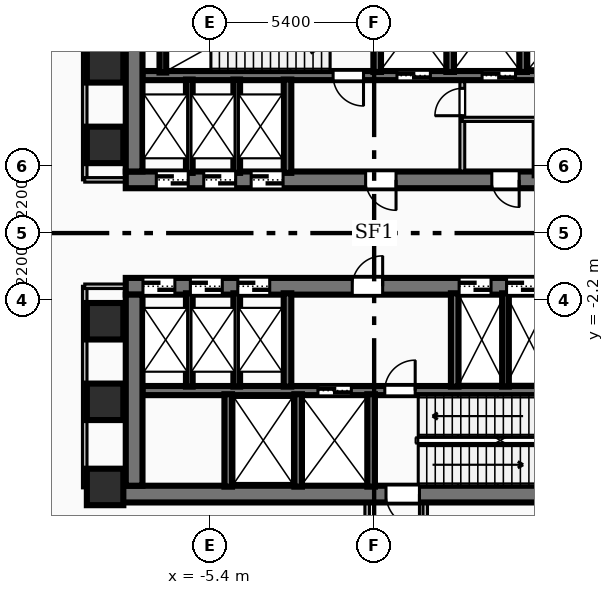
"""IFC4 building model, lengths in metres.
Left out: names, types, materials, properties, quantities, classifications, styles, units other than length and angle.
Written with IfcOpenShell. Run it as: python <this file> out.ifc"""

import sys

from ifc_helpers import new_model, si_unit, direction, frame, frame_2d, origin, origin_2d, place, context, subcontext, project, spatial, rectangle, extrude, element, fill, save


model = new_model("IFC4")
c1 = context("Model", 3, precision=1e-05, world=origin(), true_north=direction((0.0, 1.0)))
c2 = subcontext(c1, "Body", "Model", "MODEL_VIEW")
j1 = project(units=[si_unit("LENGTHUNIT", "METRE"), si_unit("PLANEANGLEUNIT", "RADIAN")], contexts=[c1])
p1 = place(None, origin())
s1 = spatial("IfcSite", under=j1, at=p1, CompositionType="ELEMENT")
p2 = place(p1, origin())
s2 = spatial("IfcBuilding", under=s1, at=p2, CompositionType="ELEMENT")
p3 = place(p2, origin())
s3 = spatial("IfcBuildingStorey", under=s2, at=p3, CompositionType="ELEMENT", Elevation=0.0)
p4 = place(p3, frame((8.17, 1.75, 0.0), z_axis=(0.0, 0.0, 1.0), x_axis=(-1.0, 0.0, 0.0)))
e1 = element("IfcWall", 1, at=p4, inside=s3, PredefinedType="SHEAR", context=c2, shape_type="SweptSolid", body=[
    extrude(rectangle(XDim=16.34, YDim=0.55, at=frame_2d((8.17, 0.0))), origin(), (0.0, 0.0, 1.0), 5.08),
])
p5 = place(p4, frame((7.45, 0.0, 0.0)))
e2 = element("IfcOpeningElement", 2, at=p5, cuts=e1, PredefinedType="OPENING", context=c2, shape_type="SweptSolid", body=[
    extrude(rectangle(XDim=1.0, YDim=2.1, at=frame_2d((0.5, 1.05))), frame((0.0, 0.285, 0.0), z_axis=(0.0, -1.0, 0.0), x_axis=(1.0, 0.0, 0.0)), (0.0, 0.0, 1.0), 0.57),
])
p6 = place(p4, frame((14.285, 0.0, 0.0)))
e3 = element("IfcOpeningElement", 3, at=p6, cuts=e1, PredefinedType="OPENING", context=c2, shape_type="SweptSolid", body=[
    extrude(rectangle(XDim=1.05, YDim=2.15, at=frame_2d((0.525, 1.075))), frame((0.0, 0.285, 0.0), z_axis=(0.0, -1.0, 0.0), x_axis=(1.0, 0.0, 0.0)), (0.0, 0.0, 1.0), 0.57),
])
p7 = place(p4, frame((12.725, 0.0, 0.0)))
e4 = element("IfcOpeningElement", 4, at=p7, cuts=e1, PredefinedType="OPENING", context=c2, shape_type="SweptSolid", body=[
    extrude(rectangle(XDim=1.05, YDim=2.15, at=frame_2d((0.525, 1.075))), frame((0.0, 0.285, 0.0), z_axis=(0.0, -1.0, 0.0), x_axis=(1.0, 0.0, 0.0)), (0.0, 0.0, 1.0), 0.57),
])
p8 = place(p4, frame((11.165, 0.0, 0.0)))
e5 = element("IfcOpeningElement", 5, at=p8, cuts=e1, PredefinedType="OPENING", context=c2, shape_type="SweptSolid", body=[
    extrude(rectangle(XDim=1.05, YDim=2.15, at=frame_2d((0.525, 1.075))), frame((0.0, 0.285, 0.0), z_axis=(0.0, -1.0, 0.0), x_axis=(1.0, 0.0, 0.0)), (0.0, 0.0, 1.0), 0.57),
])
p9 = place(p4, frame((3.4, 0.0, 0.0)))
e6 = element("IfcOpeningElement", 6, at=p9, cuts=e1, PredefinedType="OPENING", context=c2, shape_type="SweptSolid", body=[
    extrude(rectangle(XDim=0.9, YDim=2.06, at=frame_2d((0.45, 1.03))), frame((0.0, 0.285, 0.0), z_axis=(0.0, -1.0, 0.0), x_axis=(1.0, 0.0, 0.0)), (0.0, 0.0, 1.0), 0.57),
])
p10 = place(p4, frame((1.1, 0.0, 0.0)))
e7 = element("IfcOpeningElement", 7, at=p10, cuts=e1, PredefinedType="OPENING", context=c2, shape_type="SweptSolid", body=[
    extrude(rectangle(XDim=0.9, YDim=2.06, at=frame_2d((0.45, 1.03))), frame((0.0, 0.285, 0.0), z_axis=(0.0, -1.0, 0.0), x_axis=(1.0, 0.0, 0.0)), (0.0, 0.0, 1.0), 0.57),
])
p11 = place(p3, frame((-7.895, 2.025, 0.0), z_axis=(0.0, 0.0, 1.0), x_axis=(0.0, 1.0, 0.0)))
e8 = element("IfcWall", 8, at=p11, inside=s3, PredefinedType="SHEAR", context=c2, shape_type="SweptSolid", body=[
    extrude(rectangle(XDim=6.285, YDim=0.55, at=frame_2d((3.143, 0.0))), origin(), (0.0, 0.0, 1.0), 5.08),
])
p12 = place(p3, frame((7.62, 5.18, 0.0), z_axis=(0.0, 0.0, 1.0), x_axis=(-1.0, 0.0, 0.0)))
e9 = element("IfcWall", 9, at=p12, inside=s3, PredefinedType="SOLIDWALL", context=c2, shape_type="SweptSolid", body=[
    extrude(rectangle(XDim=15.24, YDim=0.3, at=frame_2d((7.62, 0.0))), origin(), (0.0, 0.0, 1.0), 5.08),
])
p13 = place(p12, frame((5.77, 0.0, 0.0)))
e10 = element("IfcOpeningElement", 10, at=p13, cuts=e9, PredefinedType="OPENING", context=c2, shape_type="SweptSolid", body=[
    extrude(rectangle(XDim=1.1, YDim=2.15, at=frame_2d((0.55, 1.075))), frame((0.0, 0.16, 0.0), z_axis=(0.0, -1.0, 0.0), x_axis=(1.0, 0.0, 0.0)), (0.0, 0.0, 1.0), 0.32),
])
p14 = place(p12, frame((2.97, 0.0, 0.0)))
e11 = element("IfcOpeningElement", 11, at=p14, cuts=e9, PredefinedType="OPENING", context=c2, shape_type="SweptSolid", body=[
    extrude(rectangle(XDim=1.1, YDim=2.15, at=frame_2d((0.55, 1.075))), frame((0.0, 0.16, 0.0), z_axis=(0.0, -1.0, 0.0), x_axis=(1.0, 0.0, 0.0)), (0.0, 0.0, 1.0), 0.32),
])
p15 = place(p12, frame((7.97, 0.0, 0.0)))
e12 = element("IfcOpeningElement", 12, at=p15, cuts=e9, PredefinedType="OPENING", context=c2, shape_type="SweptSolid", body=[
    extrude(rectangle(XDim=1.0, YDim=2.1, at=frame_2d((0.5, 1.05))), frame((0.0, 0.16, 0.0), z_axis=(0.0, -1.0, 0.0), x_axis=(1.0, 0.0, 0.0)), (0.0, 0.0, 1.0), 0.32),
])
p16 = place(p3, frame((8.78, -8.585, 0.0), z_axis=(0.0, 0.0, 1.0), x_axis=(-1.0, 0.0, 0.0)))
e13 = element("IfcWall", 13, at=p16, inside=s3, PredefinedType="SHEAR", context=c2, shape_type="SweptSolid", body=[
    extrude(rectangle(XDim=17.56, YDim=0.55, at=frame_2d((8.78, 0.0))), origin(), (0.0, 0.0, 1.0), 5.08),
])
p17 = place(p16, frame((7.29, 0.0, 0.0)))
e14 = element("IfcOpeningElement", 14, at=p17, cuts=e13, PredefinedType="OPENING", context=c2, shape_type="SweptSolid", body=[
    extrude(rectangle(XDim=1.1, YDim=2.15, at=frame_2d((0.55, 1.075))), frame((0.0, 0.285, 0.0), z_axis=(0.0, -1.0, 0.0), x_axis=(1.0, 0.0, 0.0)), (0.0, 0.0, 1.0), 0.57),
])
p18 = place(p3, frame((-8.17, -1.75, 0.0), z_axis=(0.0, 0.0, 1.0), x_axis=(1.0, 0.0, 0.0)))
e15 = element("IfcWall", 15, at=p18, inside=s3, PredefinedType="SHEAR", context=c2, shape_type="SweptSolid", body=[
    extrude(rectangle(XDim=16.34, YDim=0.55, at=frame_2d((8.17, 0.0))), origin(), (0.0, 0.0, 1.0), 5.08),
])
p19 = place(p18, frame((7.45, 0.0, 0.0)))
e16 = element("IfcOpeningElement", 16, at=p19, cuts=e15, PredefinedType="OPENING", context=c2, shape_type="SweptSolid", body=[
    extrude(rectangle(XDim=1.0, YDim=2.1, at=frame_2d((0.5, 1.05))), frame((0.0, 0.285, 0.0), z_axis=(0.0, -1.0, 0.0), x_axis=(1.0, 0.0, 0.0)), (0.0, 0.0, 1.0), 0.57),
])
p20 = place(p18, frame((10.965, 0.0, 0.0)))
e17 = element("IfcOpeningElement", 17, at=p20, cuts=e15, PredefinedType="OPENING", context=c2, shape_type="SweptSolid", body=[
    extrude(rectangle(XDim=1.05, YDim=2.15, at=frame_2d((0.525, 1.075))), frame((0.0, 0.285, 0.0), z_axis=(0.0, -1.0, 0.0), x_axis=(1.0, 0.0, 0.0)), (0.0, 0.0, 1.0), 0.57),
])
p21 = place(p18, frame((12.525, 0.0, 0.0)))
e18 = element("IfcOpeningElement", 18, at=p21, cuts=e15, PredefinedType="OPENING", context=c2, shape_type="SweptSolid", body=[
    extrude(rectangle(XDim=1.05, YDim=2.15, at=frame_2d((0.525, 1.075))), frame((0.0, 0.285, 0.0), z_axis=(0.0, -1.0, 0.0), x_axis=(1.0, 0.0, 0.0)), (0.0, 0.0, 1.0), 0.57),
])
p22 = place(p18, frame((14.085, 0.0, 0.0)))
e19 = element("IfcOpeningElement", 19, at=p22, cuts=e15, PredefinedType="OPENING", context=c2, shape_type="SweptSolid", body=[
    extrude(rectangle(XDim=1.05, YDim=2.15, at=frame_2d((0.525, 1.075))), frame((0.0, 0.285, 0.0), z_axis=(0.0, -1.0, 0.0), x_axis=(1.0, 0.0, 0.0)), (0.0, 0.0, 1.0), 0.57),
])
p23 = place(p18, frame((0.565, 0.0, 0.0)))
e20 = element("IfcOpeningElement", 20, at=p23, cuts=e15, PredefinedType="OPENING", context=c2, shape_type="SweptSolid", body=[
    extrude(rectangle(XDim=1.05, YDim=2.15, at=frame_2d((0.525, 1.075))), frame((0.0, 0.285, 0.0), z_axis=(0.0, -1.0, 0.0), x_axis=(1.0, 0.0, 0.0)), (0.0, 0.0, 1.0), 0.57),
])
p24 = place(p18, frame((2.125, 0.0, 0.0)))
e21 = element("IfcOpeningElement", 21, at=p24, cuts=e15, PredefinedType="OPENING", context=c2, shape_type="SweptSolid", body=[
    extrude(rectangle(XDim=1.05, YDim=2.15, at=frame_2d((0.525, 1.075))), frame((0.0, 0.285, 0.0), z_axis=(0.0, -1.0, 0.0), x_axis=(1.0, 0.0, 0.0)), (0.0, 0.0, 1.0), 0.57),
])
p25 = place(p18, frame((3.685, 0.0, 0.0)))
e22 = element("IfcOpeningElement", 22, at=p25, cuts=e15, PredefinedType="OPENING", context=c2, shape_type="SweptSolid", body=[
    extrude(rectangle(XDim=1.05, YDim=2.15, at=frame_2d((0.525, 1.075))), frame((0.0, 0.285, 0.0), z_axis=(0.0, -1.0, 0.0), x_axis=(1.0, 0.0, 0.0)), (0.0, 0.0, 1.0), 0.57),
])
p26 = place(p3, frame((-7.895, -8.31, 0.0), z_axis=(0.0, 0.0, 1.0), x_axis=(0.0, 1.0, 0.0)))
e23 = element("IfcWall", 23, at=p26, inside=s3, PredefinedType="SHEAR", context=c2, shape_type="SweptSolid", body=[
    extrude(rectangle(XDim=6.285, YDim=0.55, at=frame_2d((3.143, 0.0))), origin(), (0.0, 0.0, 1.0), 5.08),
])
p27 = place(p3, frame((-7.62, -5.18, 0.0), z_axis=(0.0, 0.0, 1.0), x_axis=(1.0, 0.0, 0.0)))
e24 = element("IfcWall", 24, at=p27, inside=s3, PredefinedType="SOLIDWALL", context=c2, shape_type="SweptSolid", body=[
    extrude(rectangle(XDim=15.24, YDim=0.3, at=frame_2d((7.62, 0.0))), origin(), (0.0, 0.0, 1.0), 5.08),
])
p28 = place(p27, frame((5.77, 0.0, 0.0)))
e25 = element("IfcOpeningElement", 25, at=p28, cuts=e24, PredefinedType="OPENING", context=c2, shape_type="SweptSolid", body=[
    extrude(rectangle(XDim=1.1, YDim=2.15, at=frame_2d((0.55, 1.075))), frame((0.0, 0.16, 0.0), z_axis=(0.0, -1.0, 0.0), x_axis=(1.0, 0.0, 0.0)), (0.0, 0.0, 1.0), 0.32),
])
p29 = place(p27, frame((7.97, 0.0, 0.0)))
e26 = element("IfcOpeningElement", 26, at=p29, cuts=e24, PredefinedType="OPENING", context=c2, shape_type="SweptSolid", body=[
    extrude(rectangle(XDim=1.0, YDim=2.1, at=frame_2d((0.5, 1.05))), frame((0.0, 0.16, 0.0), z_axis=(0.0, -1.0, 0.0), x_axis=(1.0, 0.0, 0.0)), (0.0, 0.0, 1.0), 0.32),
])
p30 = place(p3, frame((-6.95, 5.28, 0.0), z_axis=(0.0, 0.0, 1.0), x_axis=(0.0, 1.0, 0.0)))
e27 = element("IfcWall", 27, at=p30, inside=s3, PredefinedType="SOLIDWALL", context=c2, shape_type="SweptSolid", body=[
    extrude(rectangle(XDim=3.06, YDim=0.22, at=frame_2d((1.53, 0.0))), origin(), (0.0, 0.0, 1.0), 5.08),
])
for number, where, z_axis, x_axis in (
    (28, (0.1, 5.3, 0.0), (0.0, 0.0, 1.0), (0.0, 1.0, 0.0)),
    (29, (2.5, 5.3, 0.0), (0.0, 0.0, 1.0), (0.0, 1.0, 0.0)),
    (30, (4.9, 5.3, 0.0), (0.0, 0.0, 1.0), (0.0, 1.0, 0.0)),
):
    element("IfcWall", number, at=place(p3, frame(where, z_axis=z_axis, x_axis=x_axis)), inside=s3, PredefinedType="SOLIDWALL", context=c2, shape_type="SweptSolid", body=[
        extrude(rectangle(XDim=3.04, YDim=0.25, at=frame_2d((1.52, 0.0))), origin(), (0.0, 0.0, 1.0), 5.08),
    ])
p31 = place(p3, frame((-2.85, 1.98, 0.0), z_axis=(0.0, 0.0, 1.0), x_axis=(0.0, 1.0, 0.0)))
e31 = element("IfcWall", 31, at=p31, inside=s3, PredefinedType="SOLIDWALL", context=c2, shape_type="SweptSolid", body=[
    extrude(rectangle(XDim=3.07, YDim=0.25, at=frame_2d((1.535, 0.0))), origin(), (0.0, 0.0, 1.0), 5.08),
])
for number, where, z_axis, x_axis in (
    (32, (-0.1, -8.34, 0.0), (0.0, 0.0, 1.0), (0.0, 1.0, 0.0)),
    (33, (-2.5, -8.34, 0.0), (0.0, 0.0, 1.0), (0.0, 1.0, 0.0)),
    (34, (-4.8, -8.34, 0.0), (0.0, 0.0, 1.0), (0.0, 1.0, 0.0)),
):
    element("IfcWall", number, at=place(p3, frame(where, z_axis=z_axis, x_axis=x_axis)), inside=s3, PredefinedType="SOLIDWALL", context=c2, shape_type="SweptSolid", body=[
        extrude(rectangle(XDim=3.04, YDim=0.25, at=frame_2d((1.52, 0.0))), origin(), (0.0, 0.0, 1.0), 5.08),
    ])
for number, where, z_axis, x_axis in (
    (35, (-2.85, -5.05, 0.0), (0.0, 0.0, 1.0), (0.0, 1.0, 0.0)),
    (36, (2.65, -5.05, 0.0), (0.0, 0.0, 1.0), (0.0, 1.0, 0.0)),
):
    element("IfcWall", number, at=place(p3, frame(where, z_axis=z_axis, x_axis=x_axis)), inside=s3, PredefinedType="SOLIDWALL", context=c2, shape_type="SweptSolid", body=[
        extrude(rectangle(XDim=3.07, YDim=0.25, at=frame_2d((1.535, 0.0))), origin(), (0.0, 0.0, 1.0), 5.08),
    ])
for number, where, z_axis, x_axis in (
    (37, (-6.08, 1.98, 0.0), (0.0, 0.0, 1.0), (0.0, 1.0, 0.0)),
    (38, (-4.52, 1.98, 0.0), (0.0, 0.0, 1.0), (0.0, 1.0, 0.0)),
    (39, (4.32, -5.05, 0.0), (0.0, 0.0, 1.0), (0.0, 1.0, 0.0)),
    (40, (-6.08, -5.05, 0.0), (0.0, 0.0, 1.0), (0.0, 1.0, 0.0)),
    (41, (-4.52, -5.05, 0.0), (0.0, 0.0, 1.0), (0.0, 1.0, 0.0)),
):
    element("IfcWall", number, at=place(p3, frame(where, z_axis=z_axis, x_axis=x_axis)), inside=s3, PredefinedType="SOLIDWALL", context=c2, shape_type="SweptSolid", body=[
        extrude(rectangle(XDim=3.07, YDim=0.22, at=frame_2d((1.535, 0.0))), origin(), (0.0, 0.0, 1.0), 5.08),
    ])
for number, where, z_axis, x_axis in (
    (42, (-8.85, -5.55, 0.0), (0.0, 0.0, 1.0), (1.0, 0.0, 0.0)),
    (43, (-8.85, -2.9, 0.0), (0.0, 0.0, 1.0), (1.0, 0.0, 0.0)),
    (44, (-8.85, 2.9, 0.0), (0.0, 0.0, 1.0), (1.0, 0.0, 0.0)),
    (45, (-8.85, 5.55, 0.0), (0.0, 0.0, 1.0), (1.0, 0.0, 0.0)),
    (46, (-8.85, -8.35, 0.0), (0.0, 0.0, 1.0), (1.0, 0.0, 0.0)),
):
    element("IfcColumn", number, at=place(p3, frame(where, z_axis=z_axis, x_axis=x_axis)), inside=s3, PredefinedType="COLUMN", context=c2, shape_type="SweptSolid", body=[
        extrude(rectangle(XDim=1.2, YDim=1.2, at=origin_2d()), origin(), (0.0, 0.0, 1.0), 5.4),
    ])
p32 = place(p3, frame((2.9, 2.04, 0.0), z_axis=(0.0, 0.0, 1.0), x_axis=(0.0, 1.0, 0.0)))
e47 = element("IfcWall", 47, at=p32, inside=s3, PredefinedType="PARTITIONING", context=c2, shape_type="SweptSolid", body=[
    extrude(rectangle(XDim=2.94, YDim=0.16, at=frame_2d((1.47, 0.0))), origin(), (0.0, 0.0, 1.0), 4.145),
])
p33 = place(p32, frame((1.82, 0.0, 0.0)))
e48 = element("IfcOpeningElement", 48, at=p33, cuts=e47, PredefinedType="OPENING", context=c2, shape_type="SweptSolid", body=[
    extrude(rectangle(XDim=0.9, YDim=2.06, at=frame_2d((0.45, 1.03))), frame((0.0, 0.09, 0.0), z_axis=(0.0, -1.0, 0.0), x_axis=(1.0, 0.0, 0.0)), (0.0, 0.0, 1.0), 0.18),
])
p34 = place(p3, frame((2.9, 3.74, 0.0), z_axis=(0.0, 0.0, 1.0), x_axis=(1.0, 0.0, 0.0)))
e49 = element("IfcWall", 49, at=p34, inside=s3, PredefinedType="PARTITIONING", context=c2, shape_type="SweptSolid", body=[
    extrude(rectangle(XDim=4.65, YDim=0.138, at=frame_2d((2.325, 0.0))), origin(), (0.0, 0.0, 1.0), 5.08),
])
p35 = place(p3, frame((5.3, 1.85, 0.0), z_axis=(0.0, 0.0, 1.0), x_axis=(0.0, 1.0, 0.0)))
e50 = element("IfcWall", 50, at=p35, inside=s3, PredefinedType="PARTITIONING", context=c2, shape_type="SweptSolid", body=[
    extrude(rectangle(XDim=1.89, YDim=0.138, at=frame_2d((0.945, 0.0))), origin(), (0.0, 0.0, 1.0), 4.145),
])
p36 = place(p3, frame((-9.52, 1.75, 0.0), z_axis=(0.0, 0.0, 1.0), x_axis=(0.0, 1.0, 0.0)))
e51 = element("IfcWall", 51, at=p36, inside=s3, PredefinedType="PARTITIONING", context=c2, shape_type="SweptSolid", body=[
    extrude(rectangle(XDim=6.63, YDim=0.15, at=frame_2d((3.315, 0.0))), origin(), (0.0, 0.0, 1.0), 4.09),
])
p37 = place(p3, frame((-7.85, 1.75, 0.0), z_axis=(0.0, 0.0, 1.0), x_axis=(-1.0, 0.0, 0.0)))
e52 = element("IfcWall", 52, at=p37, inside=s3, PredefinedType="PARTITIONING", context=c2, shape_type="SweptSolid", body=[
    extrude(rectangle(XDim=1.67, YDim=0.15, at=frame_2d((0.835, 0.0))), origin(), (0.0, 0.0, 1.0), 4.145),
])
p38 = place(p3, frame((-9.52, -8.38, 0.0), z_axis=(0.0, 0.0, 1.0), x_axis=(0.0, 1.0, 0.0)))
e53 = element("IfcWall", 53, at=p38, inside=s3, PredefinedType="PARTITIONING", context=c2, shape_type="SweptSolid", body=[
    extrude(rectangle(XDim=6.63, YDim=0.15, at=frame_2d((3.315, 0.0))), origin(), (0.0, 0.0, 1.0), 4.09),
])
p39 = place(p3, frame((-7.85, -1.75, 0.0), z_axis=(0.0, 0.0, 1.0), x_axis=(-1.0, 0.0, 0.0)))
e54 = element("IfcWall", 54, at=p39, inside=s3, PredefinedType="PARTITIONING", context=c2, shape_type="SweptSolid", body=[
    extrude(rectangle(XDim=1.67, YDim=0.15, at=frame_2d((0.835, 0.0))), origin(), (0.0, 0.0, 1.0), 4.145),
])
for number, where, z_axis, x_axis in (
    (55, (-0.23, -25.15, 0.0), (0.0, 0.0, 1.0), (0.0, 1.0, 0.0)),
    (56, (1.68, -25.15, 0.0), (0.0, 0.0, 1.0), (0.0, 1.0, 0.0)),
):
    element("IfcWall", number, at=place(p3, frame(where, z_axis=z_axis, x_axis=x_axis)), inside=s3, PredefinedType="PARTITIONING", context=c2, shape_type="SweptSolid", body=[
        extrude(rectangle(XDim=16.45, YDim=0.15, at=frame_2d((8.225, 0.0))), origin(), (0.0, 0.0, 1.0), 5.08),
    ])
p40 = place(p5, origin())
e57 = element("IfcDoor", 57, at=p40, inside=s3, OperationType="SINGLE_SWING_LEFT", PredefinedType="DOOR", context=c2, shape_type="SweptSolid", body=[
    extrude(rectangle(XDim=1.0, YDim=2.1, at=frame_2d((0.5, 1.05))), frame((0.0, 0.025, 0.0), z_axis=(0.0, -1.0, 0.0), x_axis=(1.0, 0.0, 0.0)), (0.0, 0.0, 1.0), 0.05),
])
fill(e2, e57)
p41 = place(p19, origin())
e58 = element("IfcDoor", 58, at=p41, inside=s3, OperationType="SINGLE_SWING_RIGHT", PredefinedType="DOOR", context=c2, shape_type="SweptSolid", body=[
    extrude(rectangle(XDim=1.0, YDim=2.1, at=frame_2d((0.5, 1.05))), frame((0.0, 0.025, 0.0), z_axis=(0.0, -1.0, 0.0), x_axis=(1.0, 0.0, 0.0)), (0.0, 0.0, 1.0), 0.05),
])
fill(e16, e58)
p42 = place(p13, origin())
e59 = element("IfcDoor", 59, at=p42, inside=s3, OperationType="DOUBLE_DOOR_SLIDING", PredefinedType="DOOR", context=c2, shape_type="SweptSolid", body=[
    extrude(rectangle(XDim=1.1, YDim=2.15, at=frame_2d((0.55, 1.075))), frame((0.0, 0.025, 0.0), z_axis=(0.0, -1.0, 0.0), x_axis=(1.0, 0.0, 0.0)), (0.0, 0.0, 1.0), 0.05),
])
fill(e10, e59)
p43 = place(p14, origin())
e60 = element("IfcDoor", 60, at=p43, inside=s3, OperationType="DOUBLE_DOOR_SLIDING", PredefinedType="DOOR", context=c2, shape_type="SweptSolid", body=[
    extrude(rectangle(XDim=1.1, YDim=2.15, at=frame_2d((0.55, 1.075))), frame((0.0, 0.025, 0.0), z_axis=(0.0, -1.0, 0.0), x_axis=(1.0, 0.0, 0.0)), (0.0, 0.0, 1.0), 0.05),
])
fill(e11, e60)
p44 = place(p15, origin())
e61 = element("IfcDoor", 61, at=p44, inside=s3, OperationType="SINGLE_SWING_LEFT", PredefinedType="DOOR", context=c2, shape_type="SweptSolid", body=[
    extrude(rectangle(XDim=1.0, YDim=2.1, at=frame_2d((0.5, 1.05))), frame((0.0, 0.025, 0.0), z_axis=(0.0, -1.0, 0.0), x_axis=(1.0, 0.0, 0.0)), (0.0, 0.0, 1.0), 0.05),
])
fill(e12, e61)
p45 = place(p28, origin())
e62 = element("IfcDoor", 62, at=p45, inside=s3, OperationType="DOUBLE_DOOR_SLIDING", PredefinedType="DOOR", context=c2, shape_type="SweptSolid", body=[
    extrude(rectangle(XDim=1.1, YDim=2.15, at=frame_2d((0.55, 1.075))), frame((0.0, 0.025, 0.0), z_axis=(0.0, -1.0, 0.0), x_axis=(1.0, 0.0, 0.0)), (0.0, 0.0, 1.0), 0.05),
])
fill(e25, e62)
p46 = place(p29, origin())
e63 = element("IfcDoor", 63, at=p46, inside=s3, OperationType="SINGLE_SWING_RIGHT", PredefinedType="DOOR", context=c2, shape_type="SweptSolid", body=[
    extrude(rectangle(XDim=1.0, YDim=2.1, at=frame_2d((0.5, 1.05))), frame((0.0, 0.025, 0.0), z_axis=(0.0, -1.0, 0.0), x_axis=(1.0, 0.0, 0.0)), (0.0, 0.0, 1.0), 0.05),
])
fill(e26, e63)
p47 = place(p17, origin())
e64 = element("IfcDoor", 64, at=p47, inside=s3, OperationType="SINGLE_SWING_LEFT", PredefinedType="DOOR", context=c2, shape_type="SweptSolid", body=[
    extrude(rectangle(XDim=1.1, YDim=2.15, at=frame_2d((0.55, 1.075))), frame((0.0, 0.025, 0.0), z_axis=(0.0, -1.0, 0.0), x_axis=(1.0, 0.0, 0.0)), (0.0, 0.0, 1.0), 0.05),
])
fill(e14, e64)
p48 = place(p6, origin())
e65 = element("IfcDoor", 65, at=p48, inside=s3, OperationType="DOUBLE_DOOR_SLIDING", PredefinedType="DOOR", context=c2, shape_type="SweptSolid", body=[
    extrude(rectangle(XDim=1.05, YDim=2.15, at=frame_2d((0.525, 1.075))), frame((0.0, 0.025, 0.0), z_axis=(0.0, -1.0, 0.0), x_axis=(1.0, 0.0, 0.0)), (0.0, 0.0, 1.0), 0.05),
])
fill(e3, e65)
p49 = place(p7, origin())
e66 = element("IfcDoor", 66, at=p49, inside=s3, OperationType="DOUBLE_DOOR_SLIDING", PredefinedType="DOOR", context=c2, shape_type="SweptSolid", body=[
    extrude(rectangle(XDim=1.05, YDim=2.15, at=frame_2d((0.525, 1.075))), frame((0.0, 0.025, 0.0), z_axis=(0.0, -1.0, 0.0), x_axis=(1.0, 0.0, 0.0)), (0.0, 0.0, 1.0), 0.05),
])
fill(e4, e66)
p50 = place(p8, origin())
e67 = element("IfcDoor", 67, at=p50, inside=s3, OperationType="DOUBLE_DOOR_SLIDING", PredefinedType="DOOR", context=c2, shape_type="SweptSolid", body=[
    extrude(rectangle(XDim=1.05, YDim=2.15, at=frame_2d((0.525, 1.075))), frame((0.0, 0.025, 0.0), z_axis=(0.0, -1.0, 0.0), x_axis=(1.0, 0.0, 0.0)), (0.0, 0.0, 1.0), 0.05),
])
fill(e5, e67)
p51 = place(p20, origin())
e68 = element("IfcDoor", 68, at=p51, inside=s3, OperationType="DOUBLE_DOOR_SLIDING", PredefinedType="DOOR", context=c2, shape_type="SweptSolid", body=[
    extrude(rectangle(XDim=1.05, YDim=2.15, at=frame_2d((0.525, 1.075))), frame((0.0, 0.025, 0.0), z_axis=(0.0, -1.0, 0.0), x_axis=(1.0, 0.0, 0.0)), (0.0, 0.0, 1.0), 0.05),
])
fill(e17, e68)
p52 = place(p21, origin())
e69 = element("IfcDoor", 69, at=p52, inside=s3, OperationType="DOUBLE_DOOR_SLIDING", PredefinedType="DOOR", context=c2, shape_type="SweptSolid", body=[
    extrude(rectangle(XDim=1.05, YDim=2.15, at=frame_2d((0.525, 1.075))), frame((0.0, 0.025, 0.0), z_axis=(0.0, -1.0, 0.0), x_axis=(1.0, 0.0, 0.0)), (0.0, 0.0, 1.0), 0.05),
])
fill(e18, e69)
p53 = place(p23, origin())
e70 = element("IfcDoor", 70, at=p53, inside=s3, OperationType="DOUBLE_DOOR_SLIDING", PredefinedType="DOOR", context=c2, shape_type="SweptSolid", body=[
    extrude(rectangle(XDim=1.05, YDim=2.15, at=frame_2d((0.525, 1.075))), frame((0.0, 0.025, 0.0), z_axis=(0.0, -1.0, 0.0), x_axis=(1.0, 0.0, 0.0)), (0.0, 0.0, 1.0), 0.05),
])
fill(e20, e70)
p54 = place(p24, origin())
e71 = element("IfcDoor", 71, at=p54, inside=s3, OperationType="DOUBLE_DOOR_SLIDING", PredefinedType="DOOR", context=c2, shape_type="SweptSolid", body=[
    extrude(rectangle(XDim=1.05, YDim=2.15, at=frame_2d((0.525, 1.075))), frame((0.0, 0.025, 0.0), z_axis=(0.0, -1.0, 0.0), x_axis=(1.0, 0.0, 0.0)), (0.0, 0.0, 1.0), 0.05),
])
fill(e21, e71)
p55 = place(p25, origin())
e72 = element("IfcDoor", 72, at=p55, inside=s3, OperationType="DOUBLE_DOOR_SLIDING", PredefinedType="DOOR", context=c2, shape_type="SweptSolid", body=[
    extrude(rectangle(XDim=1.05, YDim=2.15, at=frame_2d((0.525, 1.075))), frame((0.0, 0.025, 0.0), z_axis=(0.0, -1.0, 0.0), x_axis=(1.0, 0.0, 0.0)), (0.0, 0.0, 1.0), 0.05),
])
fill(e22, e72)
p56 = place(p9, origin())
e73 = element("IfcDoor", 73, at=p56, inside=s3, OperationType="SINGLE_SWING_LEFT", PredefinedType="DOOR", context=c2, shape_type="SweptSolid", body=[
    extrude(rectangle(XDim=0.9, YDim=2.06, at=frame_2d((0.45, 1.03))), frame((0.0, 0.025, 0.0), z_axis=(0.0, -1.0, 0.0), x_axis=(1.0, 0.0, 0.0)), (0.0, 0.0, 1.0), 0.05),
])
fill(e6, e73)
p57 = place(p33, origin())
e74 = element("IfcDoor", 74, at=p57, inside=s3, OperationType="SINGLE_SWING_LEFT", PredefinedType="DOOR", context=c2, shape_type="SweptSolid", body=[
    extrude(rectangle(XDim=0.9, YDim=2.06, at=frame_2d((0.45, 1.03))), frame((0.0, 0.025, 0.0), z_axis=(0.0, -1.0, 0.0), x_axis=(1.0, 0.0, 0.0)), (0.0, 0.0, 1.0), 0.05),
])
fill(e48, e74)
save(model, sys.argv[1])
